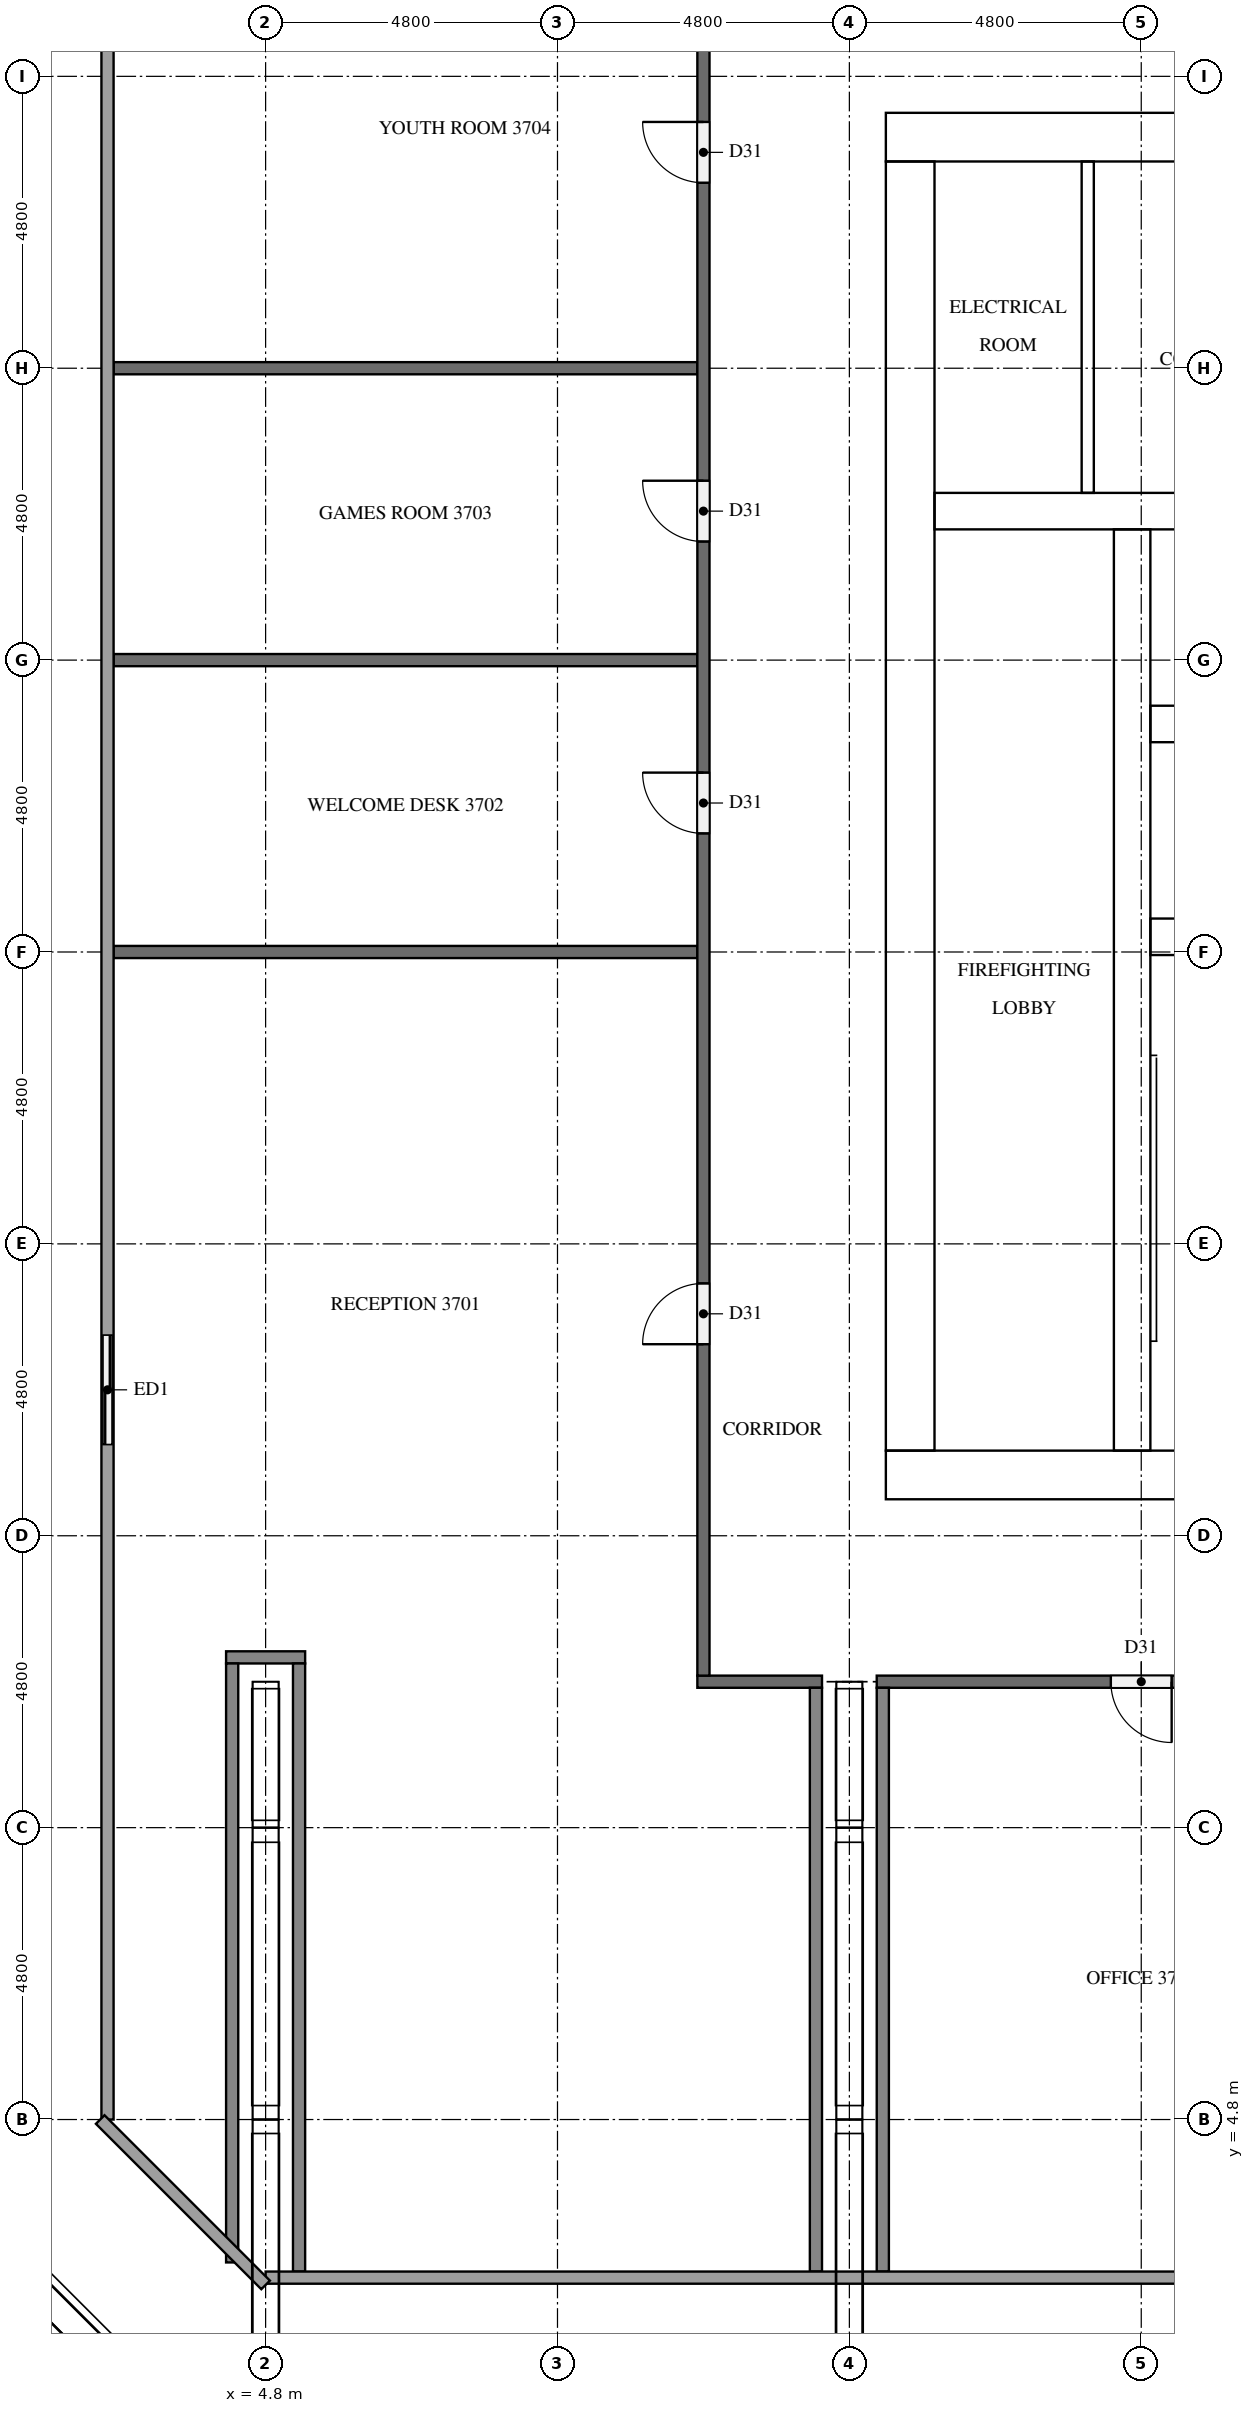
"""IFC4 building model, lengths in metres.
Left out: names, types, materials, properties, quantities, classifications, styles, units other than length and angle.
Written with IfcOpenShell. Run it as: python <this file> out.ifc"""

import sys

from ifc_helpers import new_model, si_unit, direction, frame, frame_2d, origin, place, context, subcontext, project, spatial, rectangle, extrude, element, fill, save


model = new_model("IFC4")
c1 = context("Model", 3, precision=1e-05, world=origin(), true_north=direction((0.0, 1.0)))
c2 = subcontext(c1, "Body", "Model", "MODEL_VIEW")
j1 = project(units=[si_unit("LENGTHUNIT", "METRE"), si_unit("PLANEANGLEUNIT", "RADIAN")], contexts=[c1])
p1 = place(None, origin())
s1 = spatial("IfcSite", under=j1, at=p1, CompositionType="ELEMENT")
p2 = place(p1, origin())
s2 = spatial("IfcBuilding", under=s1, at=p2, CompositionType="ELEMENT")
p3 = place(p2, frame((0.0, 0.0, 143.6)))
s3 = spatial("IfcBuildingStorey", under=s2, at=p3, CompositionType="ELEMENT", Elevation=143.6)
p4 = place(p3, frame((15.0, 15.4, 0.0), z_axis=(0.0, 0.0, 1.0), x_axis=(1.0, 0.0, 0.0)))
e1 = element("IfcWall", 1, at=p4, inside=s3, PredefinedType="SHEAR", context=c2, shape_type="SweptSolid", body=[
    extrude(rectangle(XDim=32.4, YDim=0.8, at=frame_2d((16.2, 0.0))), origin(), (0.0, 0.0, 1.0), 5.1),
])
p5 = place(p4, frame((15.3, 0.0, 0.0)))
e2 = element("IfcOpeningElement", 2, at=p5, cuts=e1, PredefinedType="OPENING", context=c2, shape_type="SweptSolid", body=[
    extrude(rectangle(XDim=1.8, YDim=2.1, at=frame_2d((0.9, 1.05))), frame((0.0, 0.41, 0.0), z_axis=(0.0, -1.0, 0.0), x_axis=(1.0, 0.0, 0.0)), (0.0, 0.0, 1.0), 0.82),
])
p6 = place(p3, frame((15.0, 37.4, 0.0), z_axis=(0.0, 0.0, 1.0), x_axis=(1.0, 0.0, 0.0)))
e3 = element("IfcWall", 3, at=p6, inside=s3, PredefinedType="SHEAR", context=c2, shape_type="SweptSolid", body=[
    extrude(rectangle(XDim=32.4, YDim=0.8, at=frame_2d((16.2, 0.0))), origin(), (0.0, 0.0, 1.0), 5.1),
])
p7 = place(p6, frame((15.3, 0.0, 0.0)))
e4 = element("IfcOpeningElement", 4, at=p7, cuts=e3, PredefinedType="OPENING", context=c2, shape_type="SweptSolid", body=[
    extrude(rectangle(XDim=1.8, YDim=2.1, at=frame_2d((0.9, 1.05))), frame((0.0, 0.41, 0.0), z_axis=(0.0, -1.0, 0.0), x_axis=(1.0, 0.0, 0.0)), (0.0, 0.0, 1.0), 0.82),
])
p8 = place(p6, frame((1.51, 0.0, 0.0)))
e5 = element("IfcOpeningElement", 5, at=p8, cuts=e3, PredefinedType="OPENING", context=c2, shape_type="SweptSolid", body=[
    extrude(rectangle(XDim=1.0, YDim=2.1, at=frame_2d((0.5, 1.05))), frame((0.0, 0.41, 0.0), z_axis=(0.0, -1.0, 0.0), x_axis=(1.0, 0.0, 0.0)), (0.0, 0.0, 1.0), 0.82),
])
p9 = place(p6, frame((5.11, 0.0, 0.0)))
e6 = element("IfcOpeningElement", 6, at=p9, cuts=e3, PredefinedType="OPENING", context=c2, shape_type="SweptSolid", body=[
    extrude(rectangle(XDim=1.0, YDim=2.1, at=frame_2d((0.5, 1.05))), frame((0.0, 0.41, 0.0), z_axis=(0.0, -1.0, 0.0), x_axis=(1.0, 0.0, 0.0)), (0.0, 0.0, 1.0), 0.82),
])
p10 = place(p3, frame((15.4, 15.8, 0.0), z_axis=(0.0, 0.0, 1.0), x_axis=(0.0, 1.0, 0.0)))
e7 = element("IfcWall", 7, at=p10, inside=s3, PredefinedType="SHEAR", context=c2, shape_type="SweptSolid", body=[
    extrude(rectangle(XDim=21.2, YDim=0.8, at=frame_2d((10.6, 0.0))), origin(), (0.0, 0.0, 1.0), 5.1),
])
p11 = place(p10, frame((4.96, 0.0, 0.0)))
e8 = element("IfcOpeningElement", 8, at=p11, cuts=e7, PredefinedType="OPENING", context=c2, shape_type="SweptSolid", body=[
    extrude(rectangle(XDim=1.2, YDim=2.1, at=frame_2d((0.6, 1.05))), frame((0.0, 0.41, 0.0), z_axis=(0.0, -1.0, 0.0), x_axis=(1.0, 0.0, 0.0)), (0.0, 0.0, 1.0), 0.82),
])
p12 = place(p3, frame((19.05, 15.8, 0.0), z_axis=(0.0, 0.0, 1.0), x_axis=(0.0, 1.0, 0.0)))
e9 = element("IfcWall", 9, at=p12, inside=s3, PredefinedType="SHEAR", context=c2, shape_type="SweptSolid", body=[
    extrude(rectangle(XDim=15.15, YDim=0.6, at=frame_2d((7.575, 0.0))), origin(), (0.0, 0.0, 1.0), 5.1),
])
p13 = place(p12, frame((9.65, 0.0, 0.0)))
e10 = element("IfcOpeningElement", 10, at=p13, cuts=e9, PredefinedType="OPENING", context=c2, shape_type="SweptSolid", body=[
    extrude(rectangle(XDim=1.1, YDim=2.1, at=frame_2d((0.55, 1.05))), frame((0.0, 0.31, 0.0), z_axis=(0.0, -1.0, 0.0), x_axis=(1.0, 0.0, 0.0)), (0.0, 0.0, 1.0), 0.62),
])
p14 = place(p12, frame((13.15, 0.0, 0.0)))
e11 = element("IfcOpeningElement", 11, at=p14, cuts=e9, PredefinedType="OPENING", context=c2, shape_type="SweptSolid", body=[
    extrude(rectangle(XDim=1.1, YDim=2.1, at=frame_2d((0.55, 1.05))), frame((0.0, 0.31, 0.0), z_axis=(0.0, -1.0, 0.0), x_axis=(1.0, 0.0, 0.0)), (0.0, 0.0, 1.0), 0.62),
])
p15 = place(p12, frame((0.4, 0.0, 0.0)))
e12 = element("IfcOpeningElement", 12, at=p15, cuts=e9, PredefinedType="OPENING", context=c2, shape_type="SweptSolid", body=[
    extrude(rectangle(XDim=1.2, YDim=2.1, at=frame_2d((0.6, 1.05))), frame((0.0, 0.31, 0.0), z_axis=(0.0, -1.0, 0.0), x_axis=(1.0, 0.0, 0.0)), (0.0, 0.0, 1.0), 0.62),
])
for number, where, z_axis, x_axis in (
    (13, (19.35, 24.25, 0.0), (0.0, 0.0, 1.0), (1.0, 0.0, 0.0)),
    (14, (19.35, 27.75, 0.0), (0.0, 0.0, 1.0), (1.0, 0.0, 0.0)),
):
    element("IfcWall", number, at=place(p3, frame(where, z_axis=z_axis, x_axis=x_axis)), inside=s3, PredefinedType="SHEAR", context=c2, shape_type="SweptSolid", body=[
        extrude(rectangle(XDim=3.45, YDim=0.6, at=frame_2d((1.725, 0.0))), origin(), (0.0, 0.0, 1.0), 5.1),
    ])
p16 = place(p3, frame((15.8, 31.25, 0.0), z_axis=(0.0, 0.0, 1.0), x_axis=(1.0, 0.0, 0.0)))
e15 = element("IfcWall", 15, at=p16, inside=s3, PredefinedType="SHEAR", context=c2, shape_type="SweptSolid", body=[
    extrude(rectangle(XDim=7.0, YDim=0.6, at=frame_2d((3.5, 0.0))), origin(), (0.0, 0.0, 1.0), 5.1),
])
p17 = place(p3, frame((2.2, 18.0, 0.0), z_axis=(0.0, 0.0, 1.0), x_axis=(0.0, -1.0, 0.0)))
e16 = element("IfcWall", 16, at=p17, inside=s3, PredefinedType="SOLIDWALL", context=c2, shape_type="SweptSolid", body=[
    extrude(rectangle(XDim=2.4, YDim=0.15, at=frame_2d((1.2, 0.0))), origin(), (0.0, 0.0, 1.0), 5.1),
])
p18 = place(p17, frame((0.3, 0.0, 0.0)))
e17 = element("IfcOpeningElement", 17, at=p18, cuts=e16, PredefinedType="OPENING", context=c2, shape_type="SweptSolid", body=[
    extrude(rectangle(XDim=1.8, YDim=2.4, at=frame_2d((0.9, 1.2))), frame((0.0, 0.085, 0.0), z_axis=(0.0, -1.0, 0.0), x_axis=(1.0, 0.0, 0.0)), (0.0, 0.0, 1.0), 0.17),
])
p19 = place(p3, frame((18.32, 31.55, 0.0), z_axis=(0.0, 0.0, 1.0), x_axis=(0.0, 1.0, 0.0)))
e18 = element("IfcWall", 18, at=p19, inside=s3, PredefinedType="PARTITIONING", context=c2, shape_type="SweptSolid", body=[
    extrude(rectangle(XDim=5.45, YDim=0.2, at=frame_2d((2.725, 0.0))), origin(), (0.0, 0.0, 1.0), 5.1),
])
p20 = place(p3, frame((11.9, 12.0, 0.0), z_axis=(0.0, 0.0, 1.0), x_axis=(1.0, 0.0, 0.0)))
e19 = element("IfcWall", 19, at=p20, inside=s3, PredefinedType="PARTITIONING", context=c2, shape_type="SweptSolid", body=[
    extrude(rectangle(XDim=2.05, YDim=0.2, at=frame_2d((1.025, 0.0))), origin(), (0.0, 0.0, 1.0), 5.1),
])
p21 = place(p3, frame((23.55, 12.0, 0.0), z_axis=(0.0, 0.0, 1.0), x_axis=(-1.0, 0.0, 0.0)))
e20 = element("IfcWall", 20, at=p21, inside=s3, PredefinedType="PARTITIONING", context=c2, shape_type="SweptSolid", body=[
    extrude(rectangle(XDim=8.7, YDim=0.2, at=frame_2d((4.35, 0.0))), origin(), (0.0, 0.0, 1.0), 5.1),
])
p22 = place(p21, frame((3.85, 0.0, 0.0)))
e21 = element("IfcOpeningElement", 21, at=p22, cuts=e20, PredefinedType="OPENING", context=c2, shape_type="SweptSolid", body=[
    extrude(rectangle(XDim=1.0, YDim=2.1, at=frame_2d((0.5, 1.05))), frame((0.0, 0.11, 0.0), z_axis=(0.0, -1.0, 0.0), x_axis=(1.0, 0.0, 0.0)), (0.0, 0.0, 1.0), 0.22),
])
p23 = place(p3, frame((4.15, 12.4, 0.0), z_axis=(0.0, 0.0, 1.0), x_axis=(1.0, 0.0, 0.0)))
e22 = element("IfcWall", 22, at=p23, inside=s3, PredefinedType="PARTITIONING", context=c2, shape_type="SweptSolid", body=[
    extrude(rectangle(XDim=1.3, YDim=0.2, at=frame_2d((0.65, 0.0))), origin(), (0.0, 0.0, 1.0), 5.1),
])
for number, where, z_axis, x_axis in (
    (23, (2.3, 24.0, 0.0), (0.0, 0.0, 1.0), (1.0, 0.0, 0.0)),
    (24, (2.3, 28.8, 0.0), (0.0, 0.0, 1.0), (1.0, 0.0, 0.0)),
    (25, (2.3, 33.6, 0.0), (0.0, 0.0, 1.0), (1.0, 0.0, 0.0)),
):
    element("IfcWall", number, at=place(p3, frame(where, z_axis=z_axis, x_axis=x_axis)), inside=s3, PredefinedType="PARTITIONING", context=c2, shape_type="SweptSolid", body=[
        extrude(rectangle(XDim=9.6, YDim=0.2, at=frame_2d((4.8, 0.0))), origin(), (0.0, 0.0, 1.0), 5.1),
    ])
p24 = place(p3, frame((4.25, 2.45, 0.0), z_axis=(0.0, 0.0, 1.0), x_axis=(0.0, 1.0, 0.0)))
e26 = element("IfcWall", 26, at=p24, inside=s3, PredefinedType="PARTITIONING", context=c2, shape_type="SweptSolid", body=[
    extrude(rectangle(XDim=9.85, YDim=0.2, at=frame_2d((4.925, 0.0))), origin(), (0.0, 0.0, 1.0), 5.1),
])
p25 = place(p3, frame((5.35, 2.3, 0.0), z_axis=(0.0, 0.0, 1.0), x_axis=(0.0, 1.0, 0.0)))
e27 = element("IfcWall", 27, at=p25, inside=s3, PredefinedType="PARTITIONING", context=c2, shape_type="SweptSolid", body=[
    extrude(rectangle(XDim=10.0, YDim=0.2, at=frame_2d((5.0, 0.0))), origin(), (0.0, 0.0, 1.0), 5.1),
])
p26 = place(p3, frame((12.0, 12.1, 0.0), z_axis=(0.0, 0.0, 1.0), x_axis=(0.0, 1.0, 0.0)))
e28 = element("IfcWall", 28, at=p26, inside=s3, PredefinedType="PARTITIONING", context=c2, shape_type="SweptSolid", body=[
    extrude(rectangle(XDim=28.6, YDim=0.2, at=frame_2d((14.3, 0.0))), origin(), (0.0, 0.0, 1.0), 5.1),
])
p27 = place(p26, frame((5.45, 0.0, 0.0)))
e29 = element("IfcOpeningElement", 29, at=p27, cuts=e28, PredefinedType="OPENING", context=c2, shape_type="SweptSolid", body=[
    extrude(rectangle(XDim=1.0, YDim=2.1, at=frame_2d((0.5, 1.05))), frame((0.0, 0.11, 0.0), z_axis=(0.0, -1.0, 0.0), x_axis=(1.0, 0.0, 0.0)), (0.0, 0.0, 1.0), 0.22),
])
p28 = place(p26, frame((13.85, 0.0, 0.0)))
e30 = element("IfcOpeningElement", 30, at=p28, cuts=e28, PredefinedType="OPENING", context=c2, shape_type="SweptSolid", body=[
    extrude(rectangle(XDim=1.0, YDim=2.1, at=frame_2d((0.5, 1.05))), frame((0.0, 0.11, 0.0), z_axis=(0.0, -1.0, 0.0), x_axis=(1.0, 0.0, 0.0)), (0.0, 0.0, 1.0), 0.22),
])
p29 = place(p26, frame((18.65, 0.0, 0.0)))
e31 = element("IfcOpeningElement", 31, at=p29, cuts=e28, PredefinedType="OPENING", context=c2, shape_type="SweptSolid", body=[
    extrude(rectangle(XDim=1.0, YDim=2.1, at=frame_2d((0.5, 1.05))), frame((0.0, 0.11, 0.0), z_axis=(0.0, -1.0, 0.0), x_axis=(1.0, 0.0, 0.0)), (0.0, 0.0, 1.0), 0.22),
])
p30 = place(p26, frame((24.55, 0.0, 0.0)))
e32 = element("IfcOpeningElement", 32, at=p30, cuts=e28, PredefinedType="OPENING", context=c2, shape_type="SweptSolid", body=[
    extrude(rectangle(XDim=1.0, YDim=2.1, at=frame_2d((0.5, 1.05))), frame((0.0, 0.11, 0.0), z_axis=(0.0, -1.0, 0.0), x_axis=(1.0, 0.0, 0.0)), (0.0, 0.0, 1.0), 0.22),
])
for number, where, z_axis, x_axis in (
    (33, (13.85, 2.3, 0.0), (0.0, 0.0, 1.0), (0.0, 1.0, 0.0)),
    (34, (14.95, 2.3, 0.0), (0.0, 0.0, 1.0), (0.0, 1.0, 0.0)),
):
    element("IfcWall", number, at=place(p3, frame(where, z_axis=z_axis, x_axis=x_axis)), inside=s3, PredefinedType="PARTITIONING", context=c2, shape_type="SweptSolid", body=[
        extrude(rectangle(XDim=9.6, YDim=0.2, at=frame_2d((4.8, 0.0))), origin(), (0.0, 0.0, 1.0), 5.1),
    ])
p31 = place(p18, origin())
e35 = element("IfcDoor", 35, at=p31, inside=s3, OperationType="SLIDING_TO_RIGHT", PredefinedType="DOOR", context=c2, shape_type="SweptSolid", body=[
    extrude(rectangle(XDim=1.8, YDim=2.4, at=frame_2d((0.9, 1.2))), frame((0.0, 0.025, 0.0), z_axis=(0.0, -1.0, 0.0), x_axis=(1.0, 0.0, 0.0)), (0.0, 0.0, 1.0), 0.05),
])
fill(e17, e35)
p32 = place(p13, origin())
e36 = element("IfcDoor", 36, at=p32, inside=s3, OperationType="DOUBLE_DOOR_SLIDING", PredefinedType="DOOR", context=c2, shape_type="SweptSolid", body=[
    extrude(rectangle(XDim=1.1, YDim=2.1, at=frame_2d((0.55, 1.05))), frame((0.0, 0.025, 0.0), z_axis=(0.0, -1.0, 0.0), x_axis=(1.0, 0.0, 0.0)), (0.0, 0.0, 1.0), 0.05),
])
fill(e10, e36)
p33 = place(p14, origin())
e37 = element("IfcDoor", 37, at=p33, inside=s3, OperationType="DOUBLE_DOOR_SLIDING", PredefinedType="DOOR", context=c2, shape_type="SweptSolid", body=[
    extrude(rectangle(XDim=1.1, YDim=2.1, at=frame_2d((0.55, 1.05))), frame((0.0, 0.025, 0.0), z_axis=(0.0, -1.0, 0.0), x_axis=(1.0, 0.0, 0.0)), (0.0, 0.0, 1.0), 0.05),
])
fill(e11, e37)
p34 = place(p15, frame((1.2, 0.0, 0.0), z_axis=(0.0, 0.0, 1.0), x_axis=(-1.0, 0.0, 0.0)))
e38 = element("IfcDoor", 38, at=p34, inside=s3, OperationType="SINGLE_SWING_LEFT", PredefinedType="DOOR", context=c2, shape_type="SweptSolid", body=[
    extrude(rectangle(XDim=1.2, YDim=2.1, at=frame_2d((0.6, 1.05))), frame((0.0, 0.025, 0.0), z_axis=(0.0, -1.0, 0.0), x_axis=(1.0, 0.0, 0.0)), (0.0, 0.0, 1.0), 0.05),
])
fill(e12, e38)
p35 = place(p11, frame((1.2, 0.0, 0.0), z_axis=(0.0, 0.0, 1.0), x_axis=(-1.0, 0.0, 0.0)))
e39 = element("IfcDoor", 39, at=p35, inside=s3, OperationType="SINGLE_SWING_RIGHT", PredefinedType="DOOR", context=c2, shape_type="SweptSolid", body=[
    extrude(rectangle(XDim=1.2, YDim=2.1, at=frame_2d((0.6, 1.05))), frame((0.0, 0.025, 0.0), z_axis=(0.0, -1.0, 0.0), x_axis=(1.0, 0.0, 0.0)), (0.0, 0.0, 1.0), 0.05),
])
fill(e8, e39)
p36 = place(p8, origin())
e40 = element("IfcDoor", 40, at=p36, inside=s3, OperationType="SINGLE_SWING_RIGHT", PredefinedType="DOOR", context=c2, shape_type="SweptSolid", body=[
    extrude(rectangle(XDim=1.0, YDim=2.1, at=frame_2d((0.5, 1.05))), frame((0.0, 0.025, 0.0), z_axis=(0.0, -1.0, 0.0), x_axis=(1.0, 0.0, 0.0)), (0.0, 0.0, 1.0), 0.05),
])
fill(e5, e40)
p37 = place(p27, origin())
e41 = element("IfcDoor", 41, at=p37, inside=s3, OperationType="SINGLE_SWING_LEFT", PredefinedType="DOOR", context=c2, shape_type="SweptSolid", body=[
    extrude(rectangle(XDim=1.0, YDim=2.1, at=frame_2d((0.5, 1.05))), frame((0.0, 0.025, 0.0), z_axis=(0.0, -1.0, 0.0), x_axis=(1.0, 0.0, 0.0)), (0.0, 0.0, 1.0), 0.05),
])
fill(e29, e41)
p38 = place(p28, origin())
e42 = element("IfcDoor", 42, at=p38, inside=s3, OperationType="SINGLE_SWING_RIGHT", PredefinedType="DOOR", context=c2, shape_type="SweptSolid", body=[
    extrude(rectangle(XDim=1.0, YDim=2.1, at=frame_2d((0.5, 1.05))), frame((0.0, 0.025, 0.0), z_axis=(0.0, -1.0, 0.0), x_axis=(1.0, 0.0, 0.0)), (0.0, 0.0, 1.0), 0.05),
])
fill(e30, e42)
p39 = place(p29, origin())
e43 = element("IfcDoor", 43, at=p39, inside=s3, OperationType="SINGLE_SWING_RIGHT", PredefinedType="DOOR", context=c2, shape_type="SweptSolid", body=[
    extrude(rectangle(XDim=1.0, YDim=2.1, at=frame_2d((0.5, 1.05))), frame((0.0, 0.025, 0.0), z_axis=(0.0, -1.0, 0.0), x_axis=(1.0, 0.0, 0.0)), (0.0, 0.0, 1.0), 0.05),
])
fill(e31, e43)
p40 = place(p30, origin())
e44 = element("IfcDoor", 44, at=p40, inside=s3, OperationType="SINGLE_SWING_RIGHT", PredefinedType="DOOR", context=c2, shape_type="SweptSolid", body=[
    extrude(rectangle(XDim=1.0, YDim=2.1, at=frame_2d((0.5, 1.05))), frame((0.0, 0.025, 0.0), z_axis=(0.0, -1.0, 0.0), x_axis=(1.0, 0.0, 0.0)), (0.0, 0.0, 1.0), 0.05),
])
fill(e32, e44)
p41 = place(p22, origin())
e45 = element("IfcDoor", 45, at=p41, inside=s3, OperationType="SINGLE_SWING_LEFT", PredefinedType="DOOR", context=c2, shape_type="SweptSolid", body=[
    extrude(rectangle(XDim=1.0, YDim=2.1, at=frame_2d((0.5, 1.05))), frame((0.0, 0.025, 0.0), z_axis=(0.0, -1.0, 0.0), x_axis=(1.0, 0.0, 0.0)), (0.0, 0.0, 1.0), 0.05),
])
fill(e21, e45)
save(model, sys.argv[1])
